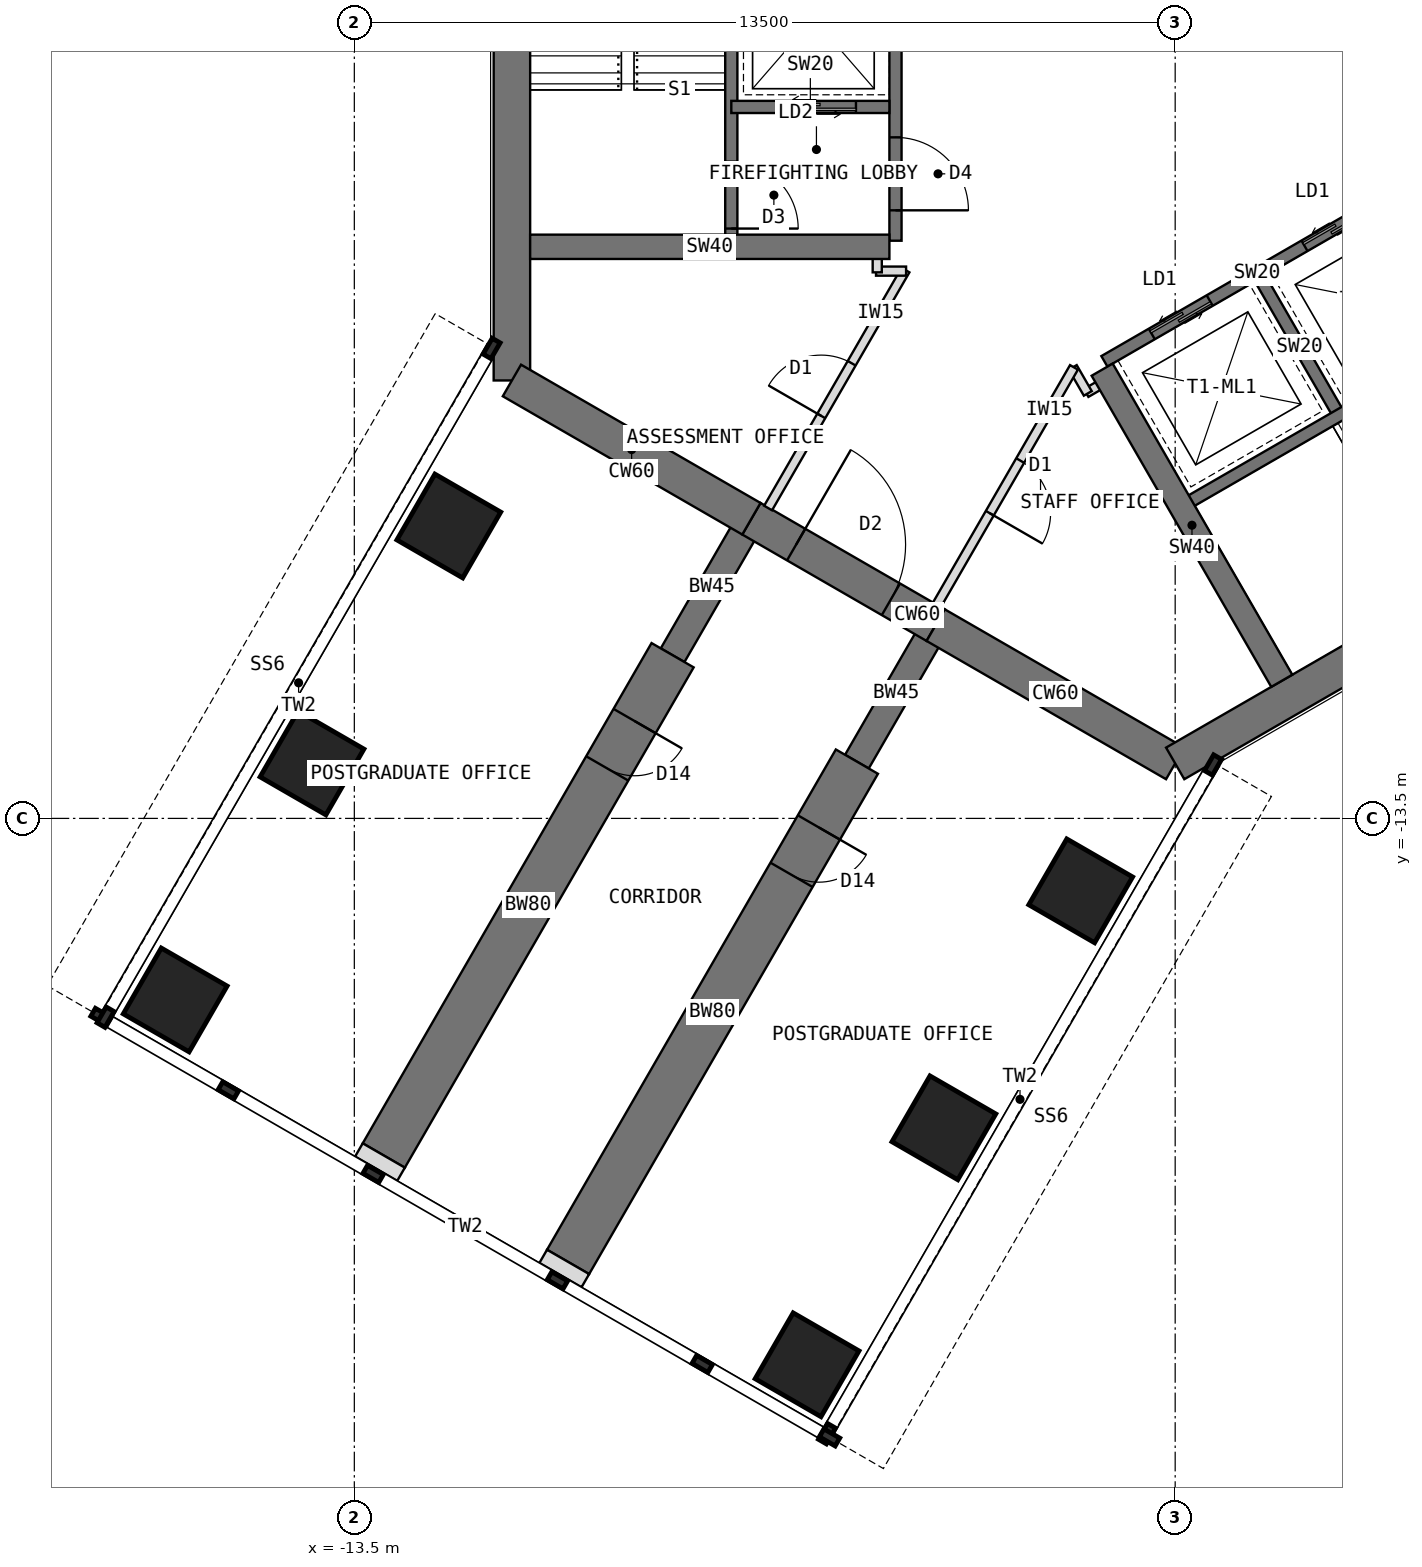
"""IFC4 building model, lengths in metres.
Left out: names, types, materials, properties, quantities, classifications, styles, units other than length and angle.
Written with IfcOpenShell. Run it as: python <this file> out.ifc"""

import sys

from ifc_helpers import new_model, si_unit, direction, frame, frame_2d, origin, origin_2d, place, context, subcontext, project, spatial, rectangle, extrude, element, fill, save


model = new_model("IFC4")
c1 = context("Model", 3, precision=1e-05, world=origin(), true_north=direction((0.0, 1.0)))
c2 = subcontext(c1, "Body", "Model", "MODEL_VIEW")
j1 = project(units=[si_unit("LENGTHUNIT", "METRE"), si_unit("PLANEANGLEUNIT", "RADIAN")], contexts=[c1])
p1 = place(None, origin())
s1 = spatial("IfcSite", under=j1, at=p1, CompositionType="ELEMENT")
p2 = place(p1, origin())
s2 = spatial("IfcBuilding", under=s1, at=p2, CompositionType="ELEMENT")
p3 = place(p2, frame((0.0, 0.0, 145.5)))
s3 = spatial("IfcBuildingStorey", under=s2, at=p3, CompositionType="ELEMENT", Elevation=145.5)
p4 = place(p3, frame((-10.908, 6.298, 0.0), z_axis=(0.0, 0.0, 1.0), x_axis=(0.0, -1.0, 0.0)))
e1 = element("IfcWall", 1, at=p4, inside=s3, PredefinedType="SHEAR", context=c2, shape_type="SweptSolid", body=[
    extrude(rectangle(XDim=12.596, YDim=0.6, at=frame_2d((6.298, 0.0))), origin(), (0.0, 0.0, 1.0), 4.0),
])
p5 = place(p3, frame((-10.908, -6.298, 0.0), z_axis=(0.0, 0.0, 1.0), x_axis=(0.866034513004, -0.499984222037, 0.0)))
e2 = element("IfcWall", 2, at=p5, inside=s3, PredefinedType="SHEAR", context=c2, shape_type="SweptSolid", body=[
    extrude(rectangle(XDim=4.548, YDim=0.6, at=frame_2d((2.274, 0.0))), origin(), (0.0, 0.0, 1.0), 4.0),
])
p6 = place(p3, frame((-6.97, -8.572, 0.0), z_axis=(0.0, 0.0, 1.0), x_axis=(0.866019471182, -0.500010275428, 0.0)))
e3 = element("IfcWall", 3, at=p6, inside=s3, PredefinedType="SHEAR", context=c2, shape_type="SweptSolid", body=[
    extrude(rectangle(XDim=3.5, YDim=0.6, at=frame_2d((1.75, 0.0))), origin(), (0.0, 0.0, 1.0), 4.0),
])
p7 = place(p6, frame((0.85, 0.0, 0.0)))
e4 = element("IfcOpeningElement", 4, at=p7, cuts=e3, PredefinedType="OPENING", context=c2, shape_type="SweptSolid", body=[
    extrude(rectangle(XDim=1.8, YDim=2.1, at=frame_2d((0.9, 1.05))), frame((0.0, 0.31, 0.0), z_axis=(0.0, -1.0, 0.0), x_axis=(1.0, 0.0, 0.0)), (0.0, 0.0, 1.0), 0.62),
])
p8 = place(p3, frame((-3.939, -10.322, 0.0), z_axis=(0.0, 0.0, 1.0), x_axis=(0.866011268655, -0.500024481964, 0.0)))
e5 = element("IfcWall", 5, at=p8, inside=s3, PredefinedType="SHEAR", context=c2, shape_type="SweptSolid", body=[
    extrude(rectangle(XDim=4.548, YDim=0.6, at=frame_2d((2.274, 0.0))), origin(), (0.0, 0.0, 1.0), 4.0),
])
p9 = place(p3, frame((0.0, -12.596, 0.0), z_axis=(0.0, 0.0, 1.0), x_axis=(0.866021940709, 0.500005998175, 0.0)))
e6 = element("IfcWall", 6, at=p9, inside=s3, PredefinedType="SHEAR", context=c2, shape_type="SweptSolid", body=[
    extrude(rectangle(XDim=12.596, YDim=0.6, at=frame_2d((6.298, 0.0))), origin(), (0.0, 0.0, 1.0), 4.0),
])
p10 = place(p3, frame((-3.939, -10.322, 0.0), z_axis=(0.0, 0.0, 1.0), x_axis=(-0.499918158782, -0.866072649678, 0.0)))
e7 = element("IfcWall", 7, at=p10, inside=s3, PredefinedType="SHEAR", context=c2, shape_type="SweptSolid", body=[
    extrude(rectangle(XDim=2.592, YDim=0.45, at=frame_2d((1.296, 0.0))), origin(), (0.0, 0.0, 1.0), 4.0),
])
p11 = place(p3, frame((-5.234, -12.566, 0.0), z_axis=(0.0, 0.0, 1.0), x_axis=(-0.499997557548, -0.86602681393, 0.0)))
e8 = element("IfcWall", 8, at=p11, inside=s3, PredefinedType="SHEAR", context=c2, shape_type="SweptSolid", body=[
    extrude(rectangle(XDim=9.5, YDim=0.8, at=frame_2d((4.75, 0.0))), origin(), (0.0, 0.0, 1.0), 4.0),
])
p12 = place(p11, frame((1.25, 0.0, 0.0)))
e9 = element("IfcOpeningElement", 9, at=p12, cuts=e8, PredefinedType="OPENING", context=c2, shape_type="SweptSolid", body=[
    extrude(rectangle(XDim=0.9, YDim=2.1, at=frame_2d((0.45, 1.05))), frame((0.0, 0.41, 0.0), z_axis=(0.0, -1.0, 0.0), x_axis=(1.0, 0.0, 0.0)), (0.0, 0.0, 1.0), 0.82),
])
p13 = place(p3, frame((-6.97, -8.572, 0.0), z_axis=(0.0, 0.0, 1.0), x_axis=(-0.499988811324, -0.866031863473, 0.0)))
e10 = element("IfcWall", 10, at=p13, inside=s3, PredefinedType="SHEAR", context=c2, shape_type="SweptSolid", body=[
    extrude(rectangle(XDim=2.592, YDim=0.45, at=frame_2d((1.296, 0.0))), origin(), (0.0, 0.0, 1.0), 4.0),
])
p14 = place(p3, frame((-8.266, -10.816, 0.0), z_axis=(0.0, 0.0, 1.0), x_axis=(-0.499997557548, -0.86602681393, 0.0)))
e11 = element("IfcWall", 11, at=p14, inside=s3, PredefinedType="SHEAR", context=c2, shape_type="SweptSolid", body=[
    extrude(rectangle(XDim=9.5, YDim=0.8, at=frame_2d((4.75, 0.0))), origin(), (0.0, 0.0, 1.0), 4.0),
])
p15 = place(p14, frame((1.25, 0.0, 0.0)))
e12 = element("IfcOpeningElement", 12, at=p15, cuts=e11, PredefinedType="OPENING", context=c2, shape_type="SweptSolid", body=[
    extrude(rectangle(XDim=0.9, YDim=2.1, at=frame_2d((0.45, 1.05))), frame((0.0, 0.41, 0.0), z_axis=(0.0, -1.0, 0.0), x_axis=(1.0, 0.0, 0.0)), (0.0, 0.0, 1.0), 0.82),
])
for number, where, z_axis, x_axis in (
    (13, (-1.554, -14.691, 0.0), (0.0, 0.0, 1.0), (0.5, 0.866, 0.0)),
    (14, (-11.946, -8.691, 0.0), (0.0, 0.0, 1.0), (0.5, 0.866, 0.0)),
    (15, (-3.804, -18.588, 0.0), (0.0, 0.0, 1.0), (0.5, 0.866, 0.0)),
    (16, (-14.196, -12.588, 0.0), (0.0, 0.0, 1.0), (0.5, 0.866, 0.0)),
    (17, (-6.054, -22.486, 0.0), (0.0, 0.0, 1.0), (0.5, 0.866, 0.0)),
    (18, (-16.446, -16.486, 0.0), (0.0, 0.0, 1.0), (0.5, 0.866, 0.0)),
):
    element("IfcColumn", number, at=place(p3, frame(where, z_axis=z_axis, x_axis=x_axis)), inside=s3, PredefinedType="COLUMN", context=c2, shape_type="SweptSolid", body=[
        extrude(rectangle(XDim=1.25, YDim=1.25, at=origin_2d()), origin(), (0.0, 0.0, 1.0), 4.0),
    ])
for number, where, z_axis, x_axis in (
    (19, (-9.984, -20.794, 0.0), (0.0, 0.0, 1.0), (-0.5, -0.866, 0.0)),
    (20, (-13.016, -19.044, 0.0), (0.0, 0.0, 1.0), (-0.5, -0.866, 0.0)),
):
    element("IfcWall", number, at=place(p3, frame(where, z_axis=z_axis, x_axis=x_axis)), inside=s3, PredefinedType="PARTITIONING", context=c2, shape_type="SweptSolid", body=[
        extrude(rectangle(XDim=0.25, YDim=0.8, at=frame_2d((0.125, 0.0))), origin(), (0.0, 0.0, 1.0), 3.8),
    ])
p16 = place(p3, frame((-4.6, 4.0, 0.0), z_axis=(0.0, 0.0, 1.0), x_axis=(0.0, -1.0, 0.0)))
e21 = element("IfcWall", 21, at=p16, inside=s3, PredefinedType="SHEAR", context=c2, shape_type="SweptSolid", body=[
    extrude(rectangle(XDim=8.0, YDim=0.2, at=frame_2d((4.0, 0.0))), origin(), (0.0, 0.0, 1.0), 4.0),
])
p17 = place(p16, frame((6.3, 0.0, 0.0)))
e22 = element("IfcOpeningElement", 22, at=p17, cuts=e21, PredefinedType="OPENING", context=c2, shape_type="SweptSolid", body=[
    extrude(rectangle(XDim=1.2, YDim=2.1, at=frame_2d((0.6, 1.05))), frame((0.0, 0.11, 0.0), z_axis=(0.0, -1.0, 0.0), x_axis=(1.0, 0.0, 0.0)), (0.0, 0.0, 1.0), 0.22),
])
p18 = place(p16, frame((0.9, 0.0, 0.0)))
e23 = element("IfcOpeningElement", 23, at=p18, cuts=e21, PredefinedType="OPENING", context=c2, shape_type="SweptSolid", body=[
    extrude(rectangle(XDim=1.1, YDim=2.2, at=frame_2d((0.55, 1.1))), frame((0.0, 0.11, 0.0), z_axis=(0.0, -1.0, 0.0), x_axis=(1.0, 0.0, 0.0)), (0.0, 0.0, 1.0), 0.22),
])
p19 = place(p3, frame((-4.7, -1.8, 0.0), z_axis=(0.0, 0.0, 1.0), x_axis=(-1.0, 0.0, 0.0)))
e24 = element("IfcWall", 24, at=p19, inside=s3, PredefinedType="SHEAR", context=c2, shape_type="SweptSolid", body=[
    extrude(rectangle(XDim=2.6, YDim=0.2, at=frame_2d((1.3, 0.0))), origin(), (0.0, 0.0, 1.0), 4.0),
])
p20 = place(p19, frame((0.55, 0.0, 0.0)))
e25 = element("IfcOpeningElement", 25, at=p20, cuts=e24, PredefinedType="OPENING", context=c2, shape_type="SweptSolid", body=[
    extrude(rectangle(XDim=1.3, YDim=2.2, at=frame_2d((0.65, 1.1))), frame((0.0, 0.11, 0.0), z_axis=(0.0, -1.0, 0.0), x_axis=(1.0, 0.0, 0.0)), (0.0, 0.0, 1.0), 0.22),
])
p21 = place(p3, frame((-7.3, 4.0, 0.0), z_axis=(0.0, 0.0, 1.0), x_axis=(0.0, -1.0, 0.0)))
e26 = element("IfcWall", 26, at=p21, inside=s3, PredefinedType="SHEAR", context=c2, shape_type="SweptSolid", body=[
    extrude(rectangle(XDim=8.0, YDim=0.2, at=frame_2d((4.0, 0.0))), origin(), (0.0, 0.0, 1.0), 4.0),
])
p22 = place(p21, frame((6.7, 0.0, 0.0)))
e27 = element("IfcOpeningElement", 27, at=p22, cuts=e26, PredefinedType="OPENING", context=c2, shape_type="SweptSolid", body=[
    extrude(rectangle(XDim=1.1, YDim=2.1, at=frame_2d((0.55, 1.05))), frame((0.0, 0.11, 0.0), z_axis=(0.0, -1.0, 0.0), x_axis=(1.0, 0.0, 0.0)), (0.0, 0.0, 1.0), 0.22),
])
p23 = place(p3, frame((-4.7, -4.1, 0.0), z_axis=(0.0, 0.0, 1.0), x_axis=(-1.0, 0.0, 0.0)))
e28 = element("IfcWall", 28, at=p23, inside=s3, PredefinedType="SHEAR", context=c2, shape_type="SweptSolid", body=[
    extrude(rectangle(XDim=5.908, YDim=0.4, at=frame_2d((2.954, 0.0))), origin(), (0.0, 0.0, 1.0), 4.0),
])
p24 = place(p3, frame((-1.164, -5.984, 0.0), z_axis=(0.0, 0.0, 1.0), x_axis=(0.866026010844, 0.49999894854, 0.0)))
e29 = element("IfcWall", 29, at=p24, inside=s3, PredefinedType="SHEAR", context=c2, shape_type="SweptSolid", body=[
    extrude(rectangle(XDim=8.0, YDim=0.2, at=frame_2d((4.0, 0.0))), origin(), (0.0, 0.0, 1.0), 4.0),
])
p25 = place(p24, frame((6.3, 0.0, 0.0)))
e30 = element("IfcOpeningElement", 30, at=p25, cuts=e29, PredefinedType="OPENING", context=c2, shape_type="SweptSolid", body=[
    extrude(rectangle(XDim=1.2, YDim=2.1, at=frame_2d((0.6, 1.05))), frame((0.0, 0.11, 0.0), z_axis=(0.0, -1.0, 0.0), x_axis=(1.0, 0.0, 0.0)), (0.0, 0.0, 1.0), 0.22),
])
p26 = place(p24, frame((0.9, 0.0, 0.0)))
e31 = element("IfcOpeningElement", 31, at=p26, cuts=e29, PredefinedType="OPENING", context=c2, shape_type="SweptSolid", body=[
    extrude(rectangle(XDim=1.1, YDim=2.2, at=frame_2d((0.55, 1.1))), frame((0.0, 0.11, 0.0), z_axis=(0.0, -1.0, 0.0), x_axis=(1.0, 0.0, 0.0)), (0.0, 0.0, 1.0), 0.22),
])
p27 = place(p24, frame((3.8, 0.0, 0.0)))
e32 = element("IfcOpeningElement", 32, at=p27, cuts=e29, PredefinedType="OPENING", context=c2, shape_type="SweptSolid", body=[
    extrude(rectangle(XDim=1.1, YDim=2.2, at=frame_2d((0.55, 1.1))), frame((0.0, 0.11, 0.0), z_axis=(0.0, -1.0, 0.0), x_axis=(1.0, 0.0, 0.0)), (0.0, 0.0, 1.0), 0.22),
])
p28 = place(p3, frame((1.397, -4.62, 0.0), z_axis=(0.0, 0.0, 1.0), x_axis=(0.499936506574, -0.866062058628, 0.0)))
e33 = element("IfcWall", 33, at=p28, inside=s3, PredefinedType="SHEAR", context=c2, shape_type="SweptSolid", body=[
    extrude(rectangle(XDim=2.6, YDim=0.2, at=frame_2d((1.3, 0.0))), origin(), (0.0, 0.0, 1.0), 4.0),
])
p29 = place(p3, frame((0.186, -8.322, 0.0), z_axis=(0.0, 0.0, 1.0), x_axis=(0.866026010844, 0.49999894854, 0.0)))
e34 = element("IfcWall", 34, at=p29, inside=s3, PredefinedType="SHEAR", context=c2, shape_type="SweptSolid", body=[
    extrude(rectangle(XDim=8.0, YDim=0.2, at=frame_2d((4.0, 0.0))), origin(), (0.0, 0.0, 1.0), 4.0),
])
p30 = place(p29, frame((6.7, 0.0, 0.0)))
e35 = element("IfcOpeningElement", 35, at=p30, cuts=e34, PredefinedType="OPENING", context=c2, shape_type="SweptSolid", body=[
    extrude(rectangle(XDim=1.1, YDim=2.1, at=frame_2d((0.55, 1.05))), frame((0.0, 0.11, 0.0), z_axis=(0.0, -1.0, 0.0), x_axis=(1.0, 0.0, 0.0)), (0.0, 0.0, 1.0), 0.22),
])
p31 = place(p3, frame((-1.201, -6.12, 0.0), z_axis=(0.0, 0.0, 1.0), x_axis=(0.49999668571, -0.866027317282, 0.0)))
e36 = element("IfcWall", 36, at=p31, inside=s3, PredefinedType="SHEAR", context=c2, shape_type="SweptSolid", body=[
    extrude(rectangle(XDim=5.908, YDim=0.4, at=frame_2d((2.954, 0.0))), origin(), (0.0, 0.0, 1.0), 4.0),
])
p32 = place(p3, frame((-1.092, -6.289, 0.0), z_axis=(0.0, 0.0, 1.0), x_axis=(-0.866138304741, -0.499804398801, 0.0)))
e37 = element("IfcWall", 37, at=p32, inside=s3, PredefinedType="PARTITIONING", context=c2, shape_type="SweptSolid", body=[
    extrude(rectangle(XDim=0.43, YDim=0.15, at=frame_2d((0.215, 0.0))), origin(), (0.0, 0.0, 1.0), 3.8),
])
p33 = place(p3, frame((-1.437, -6.511, 0.0), z_axis=(0.0, 0.0, 1.0), x_axis=(-0.50033519877, 0.865831790172, 0.0)))
e38 = element("IfcWall", 38, at=p33, inside=s3, PredefinedType="PARTITIONING", context=c2, shape_type="SweptSolid", body=[
    extrude(rectangle(XDim=0.494, YDim=0.15, at=frame_2d((0.247, 0.0))), origin(), (0.0, 0.0, 1.0), 3.8),
])
p34 = place(p3, frame((-1.664, -6.083, 0.0), z_axis=(0.0, 0.0, 1.0), x_axis=(-0.500032713409, -0.866006515865, 0.0)))
e39 = element("IfcWall", 39, at=p34, inside=s3, PredefinedType="PARTITIONING", context=c2, shape_type="SweptSolid", body=[
    extrude(rectangle(XDim=4.518, YDim=0.15, at=frame_2d((2.259, 0.0))), origin(), (0.0, 0.0, 1.0), 3.8),
])
p35 = place(p34, frame((1.769, 0.0, 0.0)))
e40 = element("IfcOpeningElement", 40, at=p35, cuts=e39, PredefinedType="OPENING", context=c2, shape_type="SweptSolid", body=[
    extrude(rectangle(XDim=1.0, YDim=2.1, at=frame_2d((0.5, 1.05))), frame((0.0, 0.085, 0.0), z_axis=(0.0, -1.0, 0.0), x_axis=(1.0, 0.0, 0.0)), (0.0, 0.0, 1.0), 0.17),
])
p36 = place(p3, frame((-6.695, -8.396, 0.0), z_axis=(0.0, 0.0, 1.0), x_axis=(0.500009315796, 0.86602002524, 0.0)))
e41 = element("IfcWall", 41, at=p36, inside=s3, PredefinedType="PARTITIONING", context=c2, shape_type="SweptSolid", body=[
    extrude(rectangle(XDim=4.519, YDim=0.15, at=frame_2d((2.259, 0.0))), origin(), (0.0, 0.0, 1.0), 3.8),
])
p37 = place(p36, frame((1.749, 0.0, 0.0)))
e42 = element("IfcOpeningElement", 42, at=p37, cuts=e41, PredefinedType="OPENING", context=c2, shape_type="SweptSolid", body=[
    extrude(rectangle(XDim=1.0, YDim=2.1, at=frame_2d((0.5, 1.05))), frame((0.0, 0.085, 0.0), z_axis=(0.0, -1.0, 0.0), x_axis=(1.0, 0.0, 0.0)), (0.0, 0.0, 1.0), 0.17),
])
p38 = place(p3, frame((-4.426, -4.5, 0.0), z_axis=(0.0, 0.0, 1.0), x_axis=(-1.0, 0.0, 0.0)))
e43 = element("IfcWall", 43, at=p38, inside=s3, PredefinedType="PARTITIONING", context=c2, shape_type="SweptSolid", body=[
    extrude(rectangle(XDim=0.494, YDim=0.15, at=frame_2d((0.247, 0.0))), origin(), (0.0, 0.0, 1.0), 3.8),
])
p39 = place(p3, frame((-4.9, -4.52, 0.0), z_axis=(0.0, 0.0, 1.0), x_axis=(0.0, 1.0, 0.0)))
e44 = element("IfcWall", 44, at=p39, inside=s3, PredefinedType="PARTITIONING", context=c2, shape_type="SweptSolid", body=[
    extrude(rectangle(XDim=0.43, YDim=0.15, at=frame_2d((0.215, 0.0))), origin(), (0.0, 0.0, 1.0), 3.8),
])
p40 = place(p17, origin())
e45 = element("IfcDoor", 45, at=p40, inside=s3, OperationType="SINGLE_SWING_RIGHT", PredefinedType="DOOR", context=c2, shape_type="SweptSolid", body=[
    extrude(rectangle(XDim=1.2, YDim=2.1, at=frame_2d((0.6, 1.05))), frame((0.0, 0.025, 0.0), z_axis=(0.0, -1.0, 0.0), x_axis=(1.0, 0.0, 0.0)), (0.0, 0.0, 1.0), 0.05),
])
fill(e22, e45)
p41 = place(p20, origin())
e46 = element("IfcDoor", 46, at=p41, inside=s3, OperationType="DOUBLE_DOOR_SLIDING", PredefinedType="DOOR", context=c2, shape_type="SweptSolid", body=[
    extrude(rectangle(XDim=1.3, YDim=2.2, at=frame_2d((0.65, 1.1))), frame((0.0, 0.025, 0.0), z_axis=(0.0, -1.0, 0.0), x_axis=(1.0, 0.0, 0.0)), (0.0, 0.0, 1.0), 0.05),
])
fill(e25, e46)
p42 = place(p22, origin())
e47 = element("IfcDoor", 47, at=p42, inside=s3, OperationType="SINGLE_SWING_RIGHT", PredefinedType="DOOR", context=c2, shape_type="SweptSolid", body=[
    extrude(rectangle(XDim=1.1, YDim=2.1, at=frame_2d((0.55, 1.05))), frame((0.0, 0.025, 0.0), z_axis=(0.0, -1.0, 0.0), x_axis=(1.0, 0.0, 0.0)), (0.0, 0.0, 1.0), 0.05),
])
fill(e27, e47)
p43 = place(p26, origin())
e48 = element("IfcDoor", 48, at=p43, inside=s3, OperationType="DOUBLE_DOOR_SLIDING", PredefinedType="DOOR", context=c2, shape_type="SweptSolid", body=[
    extrude(rectangle(XDim=1.1, YDim=2.2, at=frame_2d((0.55, 1.1))), frame((0.0, 0.025, 0.0), z_axis=(0.0, -1.0, 0.0), x_axis=(1.0, 0.0, 0.0)), (0.0, 0.0, 1.0), 0.05),
])
fill(e31, e48)
p44 = place(p27, origin())
e49 = element("IfcDoor", 49, at=p44, inside=s3, OperationType="DOUBLE_DOOR_SLIDING", PredefinedType="DOOR", context=c2, shape_type="SweptSolid", body=[
    extrude(rectangle(XDim=1.1, YDim=2.2, at=frame_2d((0.55, 1.1))), frame((0.0, 0.025, 0.0), z_axis=(0.0, -1.0, 0.0), x_axis=(1.0, 0.0, 0.0)), (0.0, 0.0, 1.0), 0.05),
])
fill(e32, e49)
p45 = place(p7, origin())
e50 = element("IfcDoor", 50, at=p45, inside=s3, OperationType="DOUBLE_DOOR_DOUBLE_SWING", PredefinedType="DOOR", context=c2, shape_type="SweptSolid", body=[
    extrude(rectangle(XDim=1.72, YDim=2.06, at=frame_2d((0.9, 1.03))), frame((0.0, 0.025, 0.0), z_axis=(0.0, -1.0, 0.0), x_axis=(1.0, 0.0, 0.0)), (0.0, 0.0, 1.0), 0.05),
    extrude(rectangle(XDim=0.04, YDim=2.1, at=frame_2d((0.02, 1.05))), frame((0.0, 0.3, 0.0), z_axis=(0.0, -1.0, 0.0), x_axis=(1.0, 0.0, 0.0)), (0.0, 0.0, 1.0), 0.6),
    extrude(rectangle(XDim=0.04, YDim=2.1, at=frame_2d((1.78, 1.05))), frame((0.0, 0.3, 0.0), z_axis=(0.0, -1.0, 0.0), x_axis=(1.0, 0.0, 0.0)), (0.0, 0.0, 1.0), 0.6),
    extrude(rectangle(XDim=1.72, YDim=0.04, at=frame_2d((0.9, 2.08))), frame((0.0, 0.3, 0.0), z_axis=(0.0, -1.0, 0.0), x_axis=(1.0, 0.0, 0.0)), (0.0, 0.0, 1.0), 0.6),
])
fill(e4, e50)
p46 = place(p37, origin())
e51 = element("IfcDoor", 51, at=p46, inside=s3, OperationType="SINGLE_SWING_LEFT", PredefinedType="DOOR", context=c2, shape_type="SweptSolid", body=[
    extrude(rectangle(XDim=1.0, YDim=2.1, at=frame_2d((0.5, 1.05))), frame((0.0, 0.025, 0.0), z_axis=(0.0, -1.0, 0.0), x_axis=(1.0, 0.0, 0.0)), (0.0, 0.0, 1.0), 0.05),
])
fill(e42, e51)
p47 = place(p35, origin())
e52 = element("IfcDoor", 52, at=p47, inside=s3, OperationType="SINGLE_SWING_RIGHT", PredefinedType="DOOR", context=c2, shape_type="SweptSolid", body=[
    extrude(rectangle(XDim=1.0, YDim=2.1, at=frame_2d((0.5, 1.05))), frame((0.0, 0.025, 0.0), z_axis=(0.0, -1.0, 0.0), x_axis=(1.0, 0.0, 0.0)), (0.0, 0.0, 1.0), 0.05),
])
fill(e40, e52)
p48 = place(p12, origin())
e53 = element("IfcDoor", 53, at=p48, inside=s3, OperationType="SINGLE_SWING_LEFT", PredefinedType="DOOR", context=c2, shape_type="SweptSolid", body=[
    extrude(rectangle(XDim=0.82, YDim=2.06, at=frame_2d((0.45, 1.03))), frame((0.0, 0.025, 0.0), z_axis=(0.0, -1.0, 0.0), x_axis=(1.0, 0.0, 0.0)), (0.0, 0.0, 1.0), 0.05),
    extrude(rectangle(XDim=0.04, YDim=2.1, at=frame_2d((0.02, 1.05))), frame((0.0, 0.4, 0.0), z_axis=(0.0, -1.0, 0.0), x_axis=(1.0, 0.0, 0.0)), (0.0, 0.0, 1.0), 0.8),
    extrude(rectangle(XDim=0.04, YDim=2.1, at=frame_2d((0.88, 1.05))), frame((0.0, 0.4, 0.0), z_axis=(0.0, -1.0, 0.0), x_axis=(1.0, 0.0, 0.0)), (0.0, 0.0, 1.0), 0.8),
    extrude(rectangle(XDim=0.82, YDim=0.04, at=frame_2d((0.45, 2.08))), frame((0.0, 0.4, 0.0), z_axis=(0.0, -1.0, 0.0), x_axis=(1.0, 0.0, 0.0)), (0.0, 0.0, 1.0), 0.8),
])
fill(e9, e53)
p49 = place(p15, origin())
e54 = element("IfcDoor", 54, at=p49, inside=s3, OperationType="SINGLE_SWING_LEFT", PredefinedType="DOOR", context=c2, shape_type="SweptSolid", body=[
    extrude(rectangle(XDim=0.82, YDim=2.06, at=frame_2d((0.45, 1.03))), frame((0.0, 0.025, 0.0), z_axis=(0.0, -1.0, 0.0), x_axis=(1.0, 0.0, 0.0)), (0.0, 0.0, 1.0), 0.05),
    extrude(rectangle(XDim=0.04, YDim=2.1, at=frame_2d((0.02, 1.05))), frame((0.0, 0.4, 0.0), z_axis=(0.0, -1.0, 0.0), x_axis=(1.0, 0.0, 0.0)), (0.0, 0.0, 1.0), 0.8),
    extrude(rectangle(XDim=0.04, YDim=2.1, at=frame_2d((0.88, 1.05))), frame((0.0, 0.4, 0.0), z_axis=(0.0, -1.0, 0.0), x_axis=(1.0, 0.0, 0.0)), (0.0, 0.0, 1.0), 0.8),
    extrude(rectangle(XDim=0.82, YDim=0.04, at=frame_2d((0.45, 2.08))), frame((0.0, 0.4, 0.0), z_axis=(0.0, -1.0, 0.0), x_axis=(1.0, 0.0, 0.0)), (0.0, 0.0, 1.0), 0.8),
])
fill(e12, e54)
save(model, sys.argv[1])
